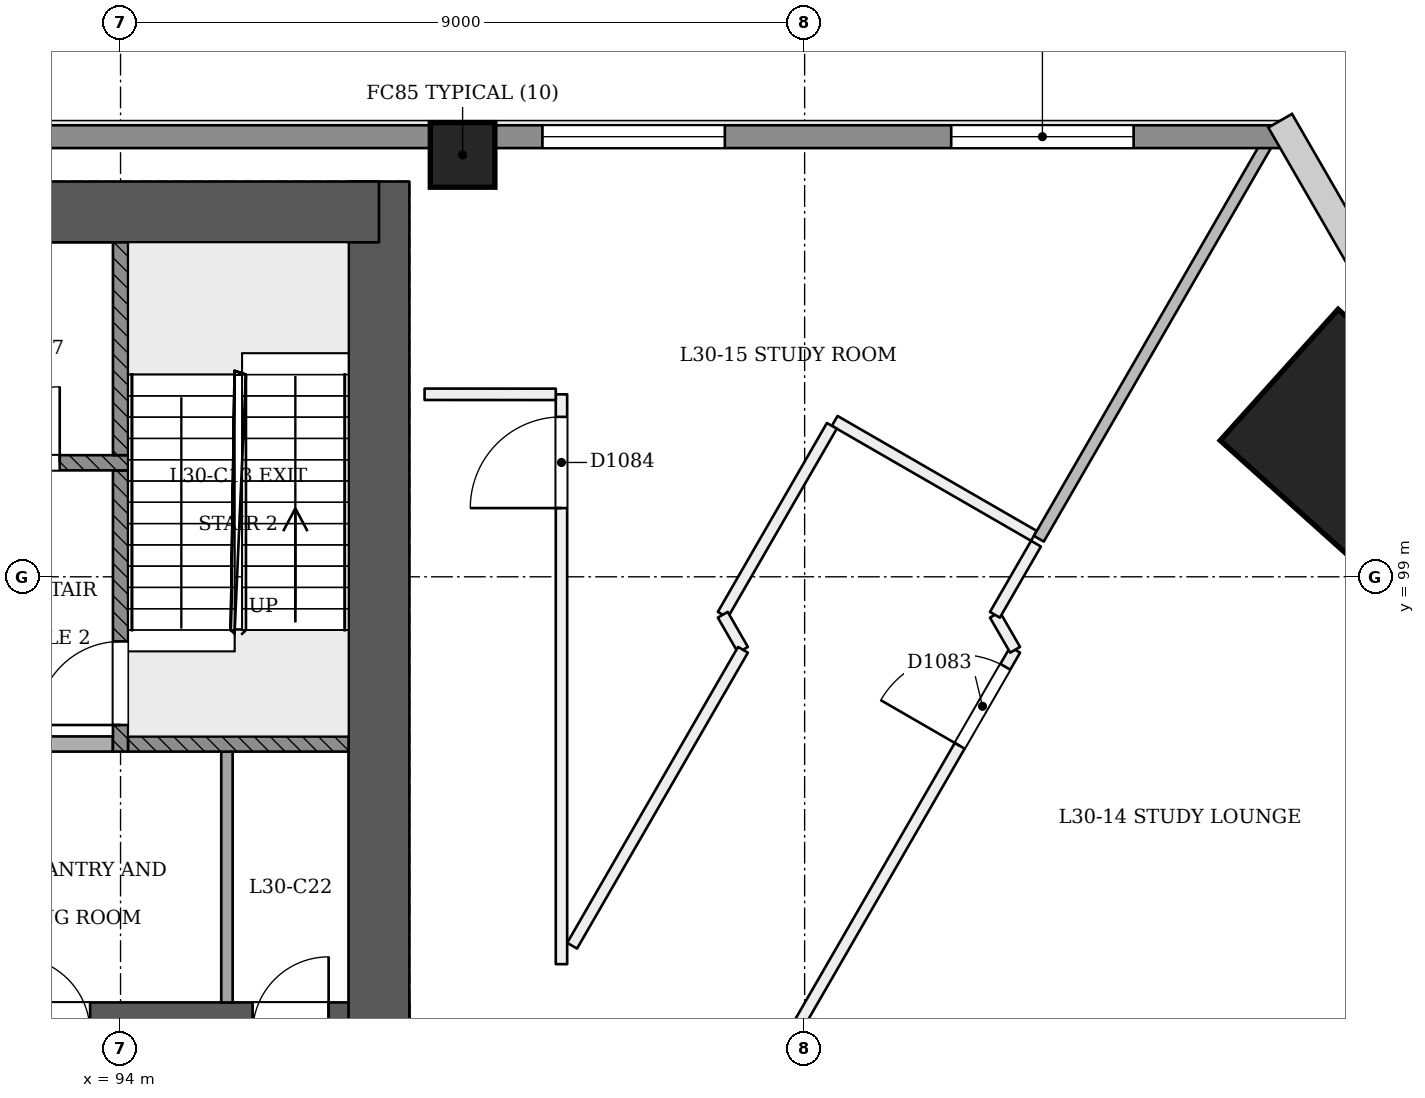
"""IFC4 building model, lengths in metres.
Left out: names, types, materials, properties, quantities, classifications, styles, units other than length and angle.
Written with IfcOpenShell. Run it as: python <this file> out.ifc"""

import sys

from ifc_helpers import new_model, si_unit, direction, frame, frame_2d, origin, origin_2d, place, context, subcontext, project, spatial, rectangle, extrude, element, fill, save


model = new_model("IFC4")
c1 = context("Model", 3, precision=1e-05, world=origin(), true_north=direction((0.0, 1.0)))
c2 = subcontext(c1, "Body", "Model", "MODEL_VIEW")
j1 = project(units=[si_unit("LENGTHUNIT", "METRE"), si_unit("PLANEANGLEUNIT", "RADIAN")], contexts=[c1])
p1 = place(None, origin())
s1 = spatial("IfcSite", under=j1, at=p1, CompositionType="ELEMENT")
p2 = place(p1, origin())
s2 = spatial("IfcBuilding", under=s1, at=p2, CompositionType="ELEMENT")
p3 = place(p2, frame((0.0, 0.0, 118.8)))
s3 = spatial("IfcBuildingStorey", under=s2, at=p3, CompositionType="ELEMENT", Elevation=118.8)
p4 = place(p3, frame((72.6, 93.0, 0.0), z_axis=(0.0, 0.0, 1.0), x_axis=(1.0, 0.0, 0.0)))
e1 = element("IfcWall", 1, at=p4, inside=s3, PredefinedType="SHEAR", context=c2, shape_type="SweptSolid", body=[
    extrude(rectangle(XDim=25.2, YDim=0.8, at=frame_2d((12.6, 0.0))), origin(), (0.0, 0.0, 1.0), 5.4),
])
p5 = place(p4, frame((1.2, 0.0, 0.0)))
e2 = element("IfcOpeningElement", 2, at=p5, cuts=e1, PredefinedType="OPENING", context=c2, shape_type="SweptSolid", body=[
    extrude(rectangle(XDim=1.2, YDim=2.1, at=frame_2d((0.6, 1.05))), frame((0.0, 0.411, 0.0), z_axis=(0.0, -1.0, 0.0), x_axis=(1.0, 0.0, 0.0)), (0.0, 0.0, 1.0), 0.821),
])
p6 = place(p4, frame((3.4, 0.0, 0.0)))
e3 = element("IfcOpeningElement", 3, at=p6, cuts=e1, PredefinedType="OPENING", context=c2, shape_type="SweptSolid", body=[
    extrude(rectangle(XDim=1.2, YDim=2.1, at=frame_2d((0.6, 1.05))), frame((0.0, 0.411, 0.0), z_axis=(0.0, -1.0, 0.0), x_axis=(1.0, 0.0, 0.0)), (0.0, 0.0, 1.0), 0.821),
])
p7 = place(p4, frame((13.4, 0.0, 0.0)))
e4 = element("IfcOpeningElement", 4, at=p7, cuts=e1, PredefinedType="OPENING", context=c2, shape_type="SweptSolid", body=[
    extrude(rectangle(XDim=1.2, YDim=2.1, at=frame_2d((0.6, 1.05))), frame((0.0, 0.411, 0.0), z_axis=(0.0, -1.0, 0.0), x_axis=(1.0, 0.0, 0.0)), (0.0, 0.0, 1.0), 0.821),
])
p8 = place(p4, frame((16.113, 0.0, 0.0)))
e5 = element("IfcOpeningElement", 5, at=p8, cuts=e1, PredefinedType="OPENING", context=c2, shape_type="SweptSolid", body=[
    extrude(rectangle(XDim=1.0, YDim=2.1, at=frame_2d((0.5, 1.05))), frame((0.0, 0.411, 0.0), z_axis=(0.0, -1.0, 0.0), x_axis=(1.0, 0.0, 0.0)), (0.0, 0.0, 1.0), 0.821),
])
p9 = place(p4, frame((20.0, 0.0, 0.0)))
e6 = element("IfcOpeningElement", 6, at=p9, cuts=e1, PredefinedType="OPENING", context=c2, shape_type="SweptSolid", body=[
    extrude(rectangle(XDim=1.0, YDim=2.1, at=frame_2d((0.5, 1.05))), frame((0.0, 0.411, 0.0), z_axis=(0.0, -1.0, 0.0), x_axis=(1.0, 0.0, 0.0)), (0.0, 0.0, 1.0), 0.821),
])
p10 = place(p4, frame((23.137, 0.0, 0.0)))
e7 = element("IfcOpeningElement", 7, at=p10, cuts=e1, PredefinedType="OPENING", context=c2, shape_type="SweptSolid", body=[
    extrude(rectangle(XDim=1.0, YDim=2.1, at=frame_2d((0.5, 1.05))), frame((0.0, 0.411, 0.0), z_axis=(0.0, -1.0, 0.0), x_axis=(1.0, 0.0, 0.0)), (0.0, 0.0, 1.0), 0.821),
])
p11 = place(p3, frame((97.4, 93.0, 0.0), z_axis=(0.0, 0.0, 1.0), x_axis=(0.0, 1.0, 0.0)))
e8 = element("IfcWall", 8, at=p11, inside=s3, PredefinedType="SHEAR", context=c2, shape_type="SweptSolid", body=[
    extrude(rectangle(XDim=11.2, YDim=0.8, at=frame_2d((5.6, 0.0))), origin(), (0.0, 0.0, 1.0), 5.4),
])
p12 = place(p3, frame((97.4, 103.8, 0.0), z_axis=(0.0, 0.0, 1.0), x_axis=(-1.0, 0.0, 0.0)))
e9 = element("IfcWall", 9, at=p12, inside=s3, PredefinedType="SHEAR", context=c2, shape_type="SweptSolid", body=[
    extrude(rectangle(XDim=25.2, YDim=0.8, at=frame_2d((12.6, 0.0))), origin(), (0.0, 0.0, 1.0), 5.4),
])
p13 = place(p3, frame((110.14, 100.87, 0.0), z_axis=(-0.028425675249, 0.009219137918, 0.999553394513), x_axis=(0.500953958552, -0.865188493132, 0.022226172915)))
e10 = element("IfcColumn", 10, at=p13, inside=s3, PredefinedType="COLUMN", context=c2, shape_type="SweptSolid", body=[
    extrude(rectangle(XDim=2.32, YDim=2.32, at=origin_2d()), origin(), (0.0, 0.0, 1.0), 5.402),
])
p14 = place(p3, frame((98.5, 104.55, 0.0), z_axis=(0.0, 0.0, 1.0), x_axis=(1.0, 0.0, 0.0)))
e11 = element("IfcColumn", 11, at=p14, inside=s3, PredefinedType="COLUMN", context=c2, shape_type="SweptSolid", body=[
    extrude(rectangle(XDim=0.85, YDim=0.85, at=origin_2d()), origin(), (0.0, 0.0, 1.0), 5.4),
])
p15 = place(p3, frame((85.266, 62.526, 0.0), z_axis=(0.0, 0.0, 1.0), x_axis=(0.500002121612, 0.866024178868, 0.0)))
e12 = element("IfcWall", 12, at=p15, inside=s3, PredefinedType="PARTITIONING", context=c2, shape_type="SweptSolid", body=[
    extrude(rectangle(XDim=41.007, YDim=0.15, at=frame_2d((20.503, 0.0))), origin(), (0.0, 0.0, 1.0), 4.55),
])
p16 = place(p15, frame((0.227, 0.0, 0.0)))
e13 = element("IfcOpeningElement", 13, at=p16, cuts=e12, PredefinedType="OPENING", context=c2, shape_type="SweptSolid", body=[
    extrude(rectangle(XDim=1.2, YDim=2.1, at=frame_2d((0.6, 1.05))), frame((0.0, 0.085, 0.0), z_axis=(0.0, -1.0, 0.0), x_axis=(1.0, 0.0, 0.0)), (0.0, 0.0, 1.0), 0.171),
])
p17 = place(p15, frame((5.304, 0.0, 0.0)))
e14 = element("IfcOpeningElement", 14, at=p17, cuts=e12, PredefinedType="OPENING", context=c2, shape_type="SweptSolid", body=[
    extrude(rectangle(XDim=1.2, YDim=2.1, at=frame_2d((0.6, 1.05))), frame((0.0, 0.085, 0.0), z_axis=(0.0, -1.0, 0.0), x_axis=(1.0, 0.0, 0.0)), (0.0, 0.0, 1.0), 0.171),
])
p18 = place(p15, frame((14.304, 0.0, 0.0)))
e15 = element("IfcOpeningElement", 15, at=p18, cuts=e12, PredefinedType="OPENING", context=c2, shape_type="SweptSolid", body=[
    extrude(rectangle(XDim=1.2, YDim=2.1, at=frame_2d((0.6, 1.05))), frame((0.0, 0.085, 0.0), z_axis=(0.0, -1.0, 0.0), x_axis=(1.0, 0.0, 0.0)), (0.0, 0.0, 1.0), 0.171),
])
p19 = place(p15, frame((26.654, 0.0, 0.0)))
e16 = element("IfcOpeningElement", 16, at=p19, cuts=e12, PredefinedType="OPENING", context=c2, shape_type="SweptSolid", body=[
    extrude(rectangle(XDim=1.2, YDim=2.1, at=frame_2d((0.6, 1.05))), frame((0.0, 0.085, 0.0), z_axis=(0.0, -1.0, 0.0), x_axis=(1.0, 0.0, 0.0)), (0.0, 0.0, 1.0), 0.171),
])
p20 = place(p15, frame((39.549, 0.0, 0.0)))
e17 = element("IfcOpeningElement", 17, at=p20, cuts=e12, PredefinedType="OPENING", context=c2, shape_type="SweptSolid", body=[
    extrude(rectangle(XDim=1.2, YDim=2.1, at=frame_2d((0.6, 1.05))), frame((0.0, 0.085, 0.0), z_axis=(0.0, -1.0, 0.0), x_axis=(1.0, 0.0, 0.0)), (0.0, 0.0, 1.0), 0.171),
])
p21 = place(p3, frame((105.77, 98.04, 0.0), z_axis=(0.0, 0.0, 1.0), x_axis=(-0.500040427072, 0.866002061945, 0.0)))
e18 = element("IfcWall", 18, at=p21, inside=s3, PredefinedType="PARTITIONING", context=c2, shape_type="SweptSolid", body=[
    extrude(rectangle(XDim=0.532, YDim=0.15, at=frame_2d((0.266, 0.0))), origin(), (0.0, 0.0, 1.0), 4.95),
])
p22 = place(p3, frame((105.504, 98.5, 0.0), z_axis=(0.0, 0.0, 1.0), x_axis=(0.500002782129, 0.866023797515, 0.0)))
e19 = element("IfcWall", 19, at=p22, inside=s3, PredefinedType="PARTITIONING", context=c2, shape_type="SweptSolid", body=[
    extrude(rectangle(XDim=1.081, YDim=0.15, at=frame_2d((0.54, 0.0))), origin(), (0.0, 0.0, 1.0), 4.95),
])
p23 = place(p3, frame((106.016, 99.538, 0.0), z_axis=(0.0, 0.0, 1.0), x_axis=(-0.866125135103, 0.49982722049, 0.0)))
e20 = element("IfcWall", 20, at=p23, inside=s3, PredefinedType="PARTITIONING", context=c2, shape_type="SweptSolid", body=[
    extrude(rectangle(XDim=3.026, YDim=0.15, at=frame_2d((1.513, 0.0))), origin(), (0.0, 0.0, 1.0), 4.95),
])
p24 = place(p3, frame((103.358, 100.986, 0.0), z_axis=(0.0, 0.0, 1.0), x_axis=(-0.500036638401, -0.866004249561, 0.0)))
e21 = element("IfcWall", 21, at=p24, inside=s3, PredefinedType="PARTITIONING", context=c2, shape_type="SweptSolid", body=[
    extrude(rectangle(XDim=2.87, YDim=0.15, at=frame_2d((1.435, 0.0))), origin(), (0.0, 0.0, 1.0), 4.95),
])
p25 = place(p3, frame((101.923, 98.5, 0.0), z_axis=(0.0, 0.0, 1.0), x_axis=(0.499298623879, -0.866429964967, 0.0)))
e22 = element("IfcWall", 22, at=p25, inside=s3, PredefinedType="PARTITIONING", context=c2, shape_type="SweptSolid", body=[
    extrude(rectangle(XDim=0.532, YDim=0.15, at=frame_2d((0.266, 0.0))), origin(), (0.0, 0.0, 1.0), 4.95),
])
p26 = place(p3, frame((102.189, 98.04, 0.0), z_axis=(0.0, 0.0, 1.0), x_axis=(-0.499999806828, -0.866025515312, 0.0)))
e23 = element("IfcWall", 23, at=p26, inside=s3, PredefinedType="PARTITIONING", context=c2, shape_type="SweptSolid", body=[
    extrude(rectangle(XDim=4.496, YDim=0.15, at=frame_2d((2.248, 0.0))), origin(), (0.0, 0.0, 1.0), 4.95),
])
p27 = place(p3, frame((99.801, 93.904, 0.0), z_axis=(0.0, 0.0, 1.0), x_axis=(0.0, 1.0, 0.0)))
e24 = element("IfcWall", 24, at=p27, inside=s3, PredefinedType="PARTITIONING", context=c2, shape_type="SweptSolid", body=[
    extrude(rectangle(XDim=7.496, YDim=0.15, at=frame_2d((3.748, 0.0))), origin(), (0.0, 0.0, 1.0), 4.95),
])
p28 = place(p27, frame((6.0, 0.0, 0.0)))
e25 = element("IfcOpeningElement", 25, at=p28, cuts=e24, PredefinedType="OPENING", context=c2, shape_type="SweptSolid", body=[
    extrude(rectangle(XDim=1.2, YDim=2.1, at=frame_2d((0.6, 1.05))), frame((0.0, 0.085, 0.0), z_axis=(0.0, -1.0, 0.0), x_axis=(1.0, 0.0, 0.0)), (0.0, 0.0, 1.0), 0.171),
])
p29 = place(p3, frame((99.726, 101.4, 0.0), z_axis=(0.0, 0.0, 1.0), x_axis=(-0.999999909973, 0.000424328109, 0.0)))
e26 = element("IfcWall", 26, at=p29, inside=s3, PredefinedType="PARTITIONING", context=c2, shape_type="SweptSolid", body=[
    extrude(rectangle(XDim=1.726, YDim=0.15, at=frame_2d((0.863, 0.0))), origin(), (0.0, 0.0, 1.0), 4.95),
])
p30 = place(p3, frame((109.198, 104.9, 0.0), z_axis=(0.0, 0.0, 1.0), x_axis=(-0.500013984911, -0.866017329442, 0.0)))
e27 = element("IfcWall", 27, at=p30, inside=s3, PredefinedType="PARTITIONING", context=c2, shape_type="SweptSolid", body=[
    extrude(rectangle(XDim=6.234, YDim=0.15, at=frame_2d((3.117, 0.0))), origin(), (0.0, 0.0, 1.0), 4.45),
])
p31 = place(p3, frame((60.744, 104.79, 0.0), z_axis=(0.0, 0.0, 1.0), x_axis=(1.0, 0.0, 0.0)))
e28 = element("IfcWall", 28, at=p31, inside=s3, PredefinedType="SOLIDWALL", context=c2, shape_type="SweptSolid", body=[
    extrude(rectangle(XDim=48.513, YDim=0.3, at=frame_2d((24.256, 0.0))), origin(), (0.0, 0.0, 1.0), 4.45),
])
p32 = place(p31, frame((44.185, 0.0, 0.9)))
e29 = element("IfcOpeningElement", 29, at=p32, cuts=e28, PredefinedType="OPENING", context=c2, shape_type="SweptSolid", body=[
    extrude(rectangle(XDim=2.4, YDim=1.5, at=frame_2d((1.2, 0.75))), frame((0.0, 0.161, 0.0), z_axis=(0.0, -1.0, 0.0), x_axis=(1.0, 0.0, 0.0)), (0.0, 0.0, 1.0), 0.321),
])
p33 = place(p31, frame((38.807, 0.0, 0.9)))
e30 = element("IfcOpeningElement", 30, at=p33, cuts=e28, PredefinedType="OPENING", context=c2, shape_type="SweptSolid", body=[
    extrude(rectangle(XDim=2.4, YDim=1.5, at=frame_2d((1.2, 0.75))), frame((0.0, 0.161, 0.0), z_axis=(0.0, -1.0, 0.0), x_axis=(1.0, 0.0, 0.0)), (0.0, 0.0, 1.0), 0.321),
])
p34 = place(p31, frame((7.307, 0.0, 0.9)))
e31 = element("IfcOpeningElement", 31, at=p34, cuts=e28, PredefinedType="OPENING", context=c2, shape_type="SweptSolid", body=[
    extrude(rectangle(XDim=2.4, YDim=1.5, at=frame_2d((1.2, 0.75))), frame((0.0, 0.161, 0.0), z_axis=(0.0, -1.0, 0.0), x_axis=(1.0, 0.0, 0.0)), (0.0, 0.0, 1.0), 0.321),
])
p35 = place(p31, frame((1.929, 0.0, 0.9)))
e32 = element("IfcOpeningElement", 32, at=p35, cuts=e28, PredefinedType="OPENING", context=c2, shape_type="SweptSolid", body=[
    extrude(rectangle(XDim=2.4, YDim=1.5, at=frame_2d((1.2, 0.75))), frame((0.0, 0.161, 0.0), z_axis=(0.0, -1.0, 0.0), x_axis=(1.0, 0.0, 0.0)), (0.0, 0.0, 1.0), 0.321),
])
p36 = place(p3, frame((95.4, 93.4, 0.0), z_axis=(0.0, 0.0, 1.0), x_axis=(0.0, 1.0, 0.0)))
e33 = element("IfcWall", 33, at=p36, inside=s3, PredefinedType="PARTITIONING", context=c2, shape_type="SweptSolid", body=[
    extrude(rectangle(XDim=3.3, YDim=0.15, at=frame_2d((1.65, 0.0))), origin(), (0.0, 0.0, 1.0), 4.95),
])
p37 = place(p3, frame((91.5, 96.8, 0.0), z_axis=(0.0, 0.0, 1.0), x_axis=(1.0, 0.0, 0.0)))
e34 = element("IfcWall", 34, at=p37, inside=s3, PredefinedType="PARTITIONING", context=c2, shape_type="SweptSolid", body=[
    extrude(rectangle(XDim=2.4, YDim=0.2, at=frame_2d((1.2, 0.0))), origin(), (0.0, 0.0, 1.0), 4.95),
])
p38 = place(p3, frame((94.0, 96.7, 0.0), z_axis=(0.0, 0.0, 1.0), x_axis=(0.0, 1.0, 0.0)))
e35 = element("IfcWall", 35, at=p38, inside=s3, PredefinedType="SOLIDWALL", context=c2, shape_type="SweptSolid", body=[
    extrude(rectangle(XDim=3.7, YDim=0.2, at=frame_2d((1.85, 0.0))), origin(), (0.0, 0.0, 1.0), 4.95),
])
p39 = place(p38, frame((0.35, 0.0, 0.0)))
e36 = element("IfcOpeningElement", 36, at=p39, cuts=e35, PredefinedType="OPENING", context=c2, shape_type="SweptSolid", body=[
    extrude(rectangle(XDim=1.1, YDim=2.1, at=frame_2d((0.55, 1.05))), frame((0.0, 0.11, 0.0), z_axis=(0.0, -1.0, 0.0), x_axis=(1.0, 0.0, 0.0)), (0.0, 0.0, 1.0), 0.221),
])
p40 = place(p3, frame((94.1, 96.8, 0.0), z_axis=(0.0, 0.0, 1.0), x_axis=(1.0, 0.0, 0.0)))
e37 = element("IfcWall", 37, at=p40, inside=s3, PredefinedType="SOLIDWALL", context=c2, shape_type="SweptSolid", body=[
    extrude(rectangle(XDim=2.9, YDim=0.2, at=frame_2d((1.45, 0.0))), origin(), (0.0, 0.0, 1.0), 4.95),
])
p41 = place(p3, frame((75.9, 100.5, 0.0), z_axis=(0.0, 0.0, 1.0), x_axis=(1.0, 0.0, 0.0)))
e38 = element("IfcWall", 38, at=p41, inside=s3, PredefinedType="SOLIDWALL", context=c2, shape_type="SweptSolid", body=[
    extrude(rectangle(XDim=18.2, YDim=0.2, at=frame_2d((9.1, 0.0))), origin(), (0.0, 0.0, 1.0), 4.95),
])
p42 = place(p41, frame((2.6, 0.0, 0.0)))
e39 = element("IfcOpeningElement", 39, at=p42, cuts=e38, PredefinedType="OPENING", context=c2, shape_type="SweptSolid", body=[
    extrude(rectangle(XDim=1.1, YDim=2.1, at=frame_2d((0.55, 1.05))), frame((0.0, 0.11, 0.0), z_axis=(0.0, -1.0, 0.0), x_axis=(1.0, 0.0, 0.0)), (0.0, 0.0, 1.0), 0.221),
])
p43 = place(p41, frame((4.5, 0.0, 0.0)))
e40 = element("IfcOpeningElement", 40, at=p43, cuts=e38, PredefinedType="OPENING", context=c2, shape_type="SweptSolid", body=[
    extrude(rectangle(XDim=1.1, YDim=2.1, at=frame_2d((0.55, 1.05))), frame((0.0, 0.11, 0.0), z_axis=(0.0, -1.0, 0.0), x_axis=(1.0, 0.0, 0.0)), (0.0, 0.0, 1.0), 0.221),
])
p44 = place(p41, frame((6.4, 0.0, 0.0)))
e41 = element("IfcOpeningElement", 41, at=p44, cuts=e38, PredefinedType="OPENING", context=c2, shape_type="SweptSolid", body=[
    extrude(rectangle(XDim=1.1, YDim=2.1, at=frame_2d((0.55, 1.05))), frame((0.0, 0.11, 0.0), z_axis=(0.0, -1.0, 0.0), x_axis=(1.0, 0.0, 0.0)), (0.0, 0.0, 1.0), 0.221),
])
p45 = place(p41, frame((8.3, 0.0, 0.0)))
e42 = element("IfcOpeningElement", 42, at=p45, cuts=e38, PredefinedType="OPENING", context=c2, shape_type="SweptSolid", body=[
    extrude(rectangle(XDim=1.1, YDim=2.1, at=frame_2d((0.55, 1.05))), frame((0.0, 0.11, 0.0), z_axis=(0.0, -1.0, 0.0), x_axis=(1.0, 0.0, 0.0)), (0.0, 0.0, 1.0), 0.221),
])
p46 = place(p41, frame((10.2, 0.0, 0.0)))
e43 = element("IfcOpeningElement", 43, at=p46, cuts=e38, PredefinedType="OPENING", context=c2, shape_type="SweptSolid", body=[
    extrude(rectangle(XDim=1.1, YDim=2.1, at=frame_2d((0.55, 1.05))), frame((0.0, 0.11, 0.0), z_axis=(0.0, -1.0, 0.0), x_axis=(1.0, 0.0, 0.0)), (0.0, 0.0, 1.0), 0.221),
])
p47 = place(p41, frame((12.1, 0.0, 0.0)))
e44 = element("IfcOpeningElement", 44, at=p47, cuts=e38, PredefinedType="OPENING", context=c2, shape_type="SweptSolid", body=[
    extrude(rectangle(XDim=1.1, YDim=2.1, at=frame_2d((0.55, 1.05))), frame((0.0, 0.11, 0.0), z_axis=(0.0, -1.0, 0.0), x_axis=(1.0, 0.0, 0.0)), (0.0, 0.0, 1.0), 0.221),
])
p48 = place(p41, frame((14.0, 0.0, 0.0)))
e45 = element("IfcOpeningElement", 45, at=p48, cuts=e38, PredefinedType="OPENING", context=c2, shape_type="SweptSolid", body=[
    extrude(rectangle(XDim=1.1, YDim=2.1, at=frame_2d((0.55, 1.05))), frame((0.0, 0.11, 0.0), z_axis=(0.0, -1.0, 0.0), x_axis=(1.0, 0.0, 0.0)), (0.0, 0.0, 1.0), 0.221),
])
p49 = place(p41, frame((0.65, 0.0, 0.0)))
e46 = element("IfcOpeningElement", 46, at=p49, cuts=e38, PredefinedType="OPENING", context=c2, shape_type="SweptSolid", body=[
    extrude(rectangle(XDim=1.0, YDim=2.1, at=frame_2d((0.5, 1.05))), frame((0.0, 0.11, 0.0), z_axis=(0.0, -1.0, 0.0), x_axis=(1.0, 0.0, 0.0)), (0.0, 0.0, 1.0), 0.221),
])
p50 = place(p41, frame((16.3, 0.0, 0.0)))
e47 = element("IfcOpeningElement", 47, at=p50, cuts=e38, PredefinedType="OPENING", context=c2, shape_type="SweptSolid", body=[
    extrude(rectangle(XDim=1.0, YDim=2.1, at=frame_2d((0.5, 1.05))), frame((0.0, 0.11, 0.0), z_axis=(0.0, -1.0, 0.0), x_axis=(1.0, 0.0, 0.0)), (0.0, 0.0, 1.0), 0.221),
])
p51 = place(p3, frame((94.0, 100.6, 0.0), z_axis=(0.0, 0.0, 1.0), x_axis=(0.0, 1.0, 0.0)))
e48 = element("IfcWall", 48, at=p51, inside=s3, PredefinedType="SOLIDWALL", context=c2, shape_type="SweptSolid", body=[
    extrude(rectangle(XDim=2.8, YDim=0.2, at=frame_2d((1.4, 0.0))), origin(), (0.0, 0.0, 1.0), 4.95),
])
p52 = place(p20, origin())
e49 = element("IfcDoor", 49, at=p52, inside=s3, OperationType="SINGLE_SWING_LEFT", PredefinedType="NOTDEFINED", context=c2, shape_type="SweptSolid", body=[
    extrude(rectangle(XDim=1.2, YDim=2.1, at=frame_2d((0.6, 1.05))), frame((0.0, 0.025, 0.0), z_axis=(0.0, -1.0, 0.0), x_axis=(1.0, 0.0, 0.0)), (0.0, 0.0, 1.0), 0.05),
])
fill(e17, e49)
p53 = place(p28, origin())
e50 = element("IfcDoor", 50, at=p53, inside=s3, OperationType="SINGLE_SWING_LEFT", PredefinedType="NOTDEFINED", context=c2, shape_type="SweptSolid", body=[
    extrude(rectangle(XDim=1.2, YDim=2.1, at=frame_2d((0.6, 1.05))), frame((0.0, 0.025, 0.0), z_axis=(0.0, -1.0, 0.0), x_axis=(1.0, 0.0, 0.0)), (0.0, 0.0, 1.0), 0.05),
])
fill(e25, e50)
p54 = place(p32, origin())
e51 = element("IfcWindow", 51, at=p54, inside=s3, PartitioningType="SINGLE_PANEL", PredefinedType="WINDOW", context=c2, shape_type="SweptSolid", body=[
    extrude(rectangle(XDim=2.4, YDim=1.5, at=frame_2d((1.2, 0.75))), frame((0.0, 0.03, 0.0), z_axis=(0.0, -1.0, 0.0), x_axis=(1.0, 0.0, 0.0)), (0.0, 0.0, 1.0), 0.06),
])
fill(e29, e51)
p55 = place(p33, origin())
e52 = element("IfcWindow", 52, at=p55, inside=s3, PartitioningType="SINGLE_PANEL", PredefinedType="WINDOW", context=c2, shape_type="SweptSolid", body=[
    extrude(rectangle(XDim=2.4, YDim=1.5, at=frame_2d((1.2, 0.75))), frame((0.0, 0.03, 0.0), z_axis=(0.0, -1.0, 0.0), x_axis=(1.0, 0.0, 0.0)), (0.0, 0.0, 1.0), 0.06),
])
fill(e30, e52)
p56 = place(p39, origin())
e53 = element("IfcDoor", 53, at=p56, inside=s3, OperationType="SINGLE_SWING_LEFT", PredefinedType="NOTDEFINED", context=c2, shape_type="SweptSolid", body=[
    extrude(rectangle(XDim=1.1, YDim=2.1, at=frame_2d((0.55, 1.05))), frame((0.0, 0.025, 0.0), z_axis=(0.0, -1.0, 0.0), x_axis=(1.0, 0.0, 0.0)), (0.0, 0.0, 1.0), 0.05),
])
fill(e36, e53)
p57 = place(p50, origin())
e54 = element("IfcDoor", 54, at=p57, inside=s3, OperationType="SINGLE_SWING_RIGHT", PredefinedType="NOTDEFINED", context=c2, shape_type="SweptSolid", body=[
    extrude(rectangle(XDim=1.0, YDim=2.1, at=frame_2d((0.5, 1.05))), frame((0.0, 0.025, 0.0), z_axis=(0.0, -1.0, 0.0), x_axis=(1.0, 0.0, 0.0)), (0.0, 0.0, 1.0), 0.05),
])
fill(e47, e54)
save(model, sys.argv[1])
